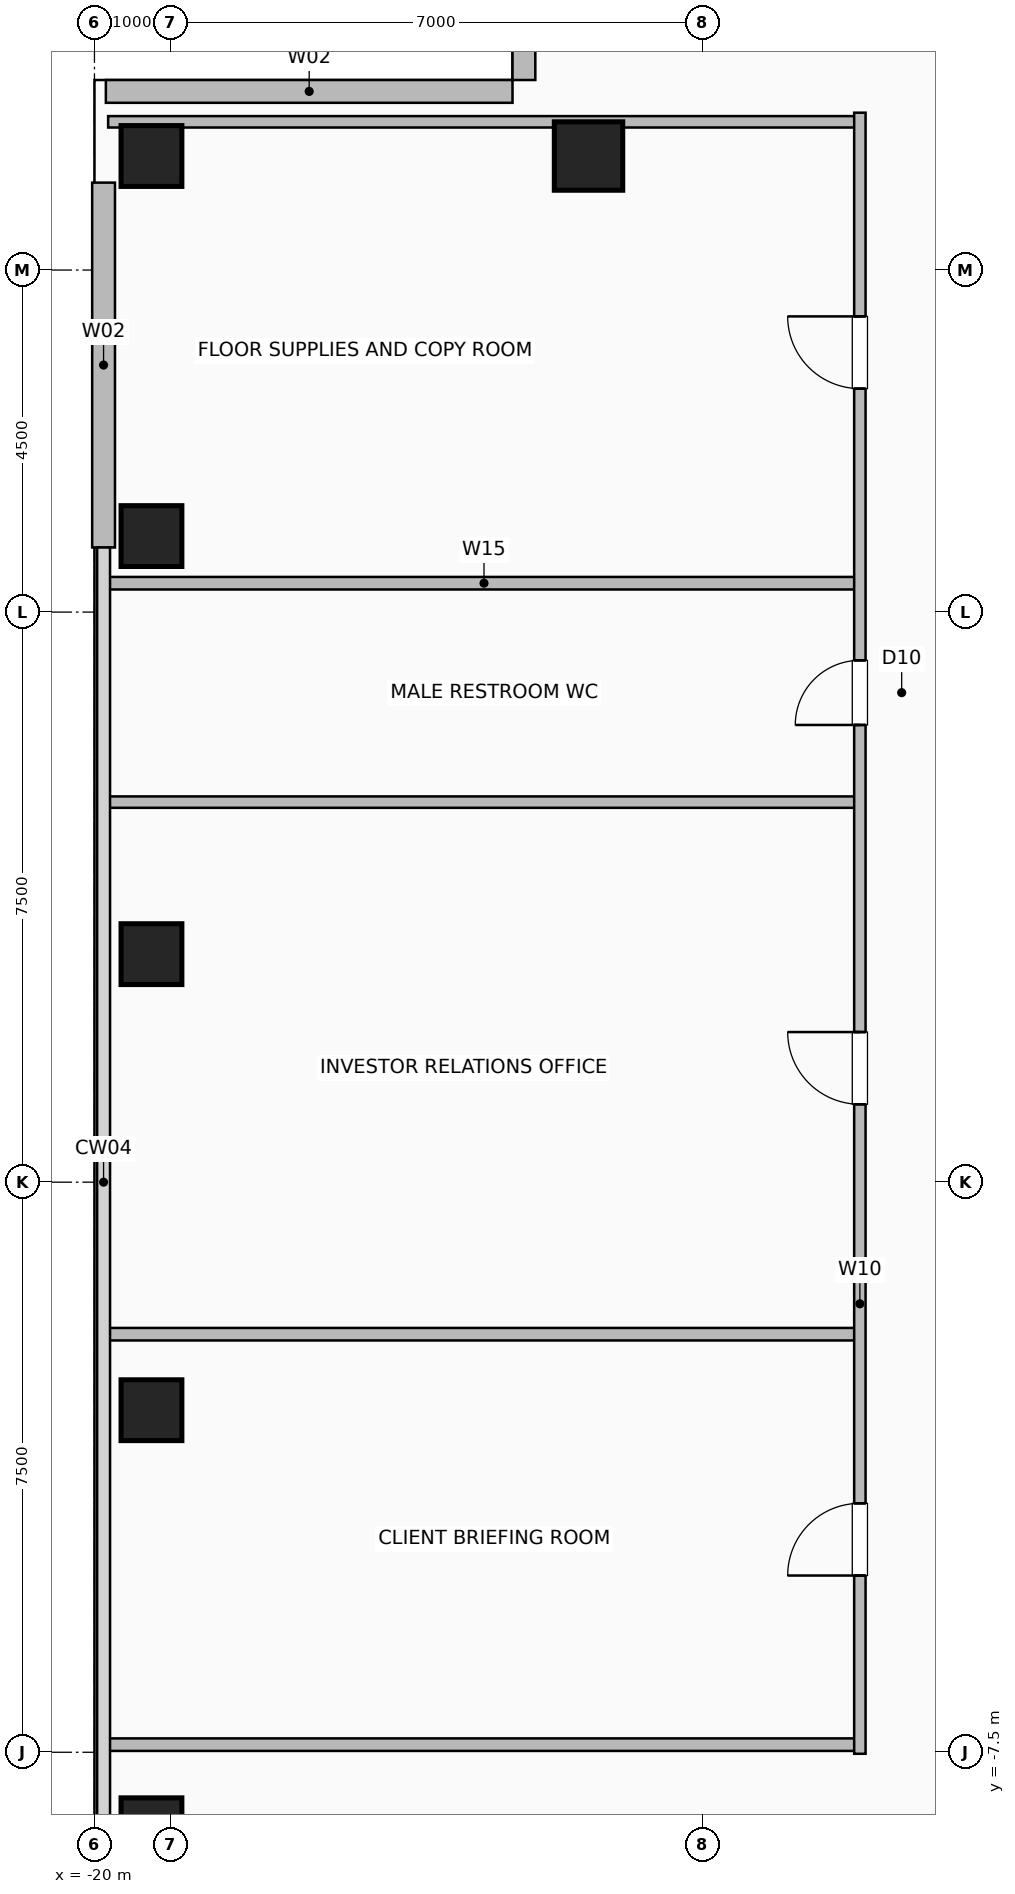
"""IFC4 building model, lengths in metres.
Left out: names, types, materials, properties, quantities, classifications, styles, units other than length and angle.
Written with IfcOpenShell. Run it as: python <this file> out.ifc"""

import sys

from ifc_helpers import new_model, si_unit, direction, frame, frame_2d, origin, origin_2d, place, context, subcontext, project, spatial, rectangle, hollow_rectangle, extrude, element, fill, save


model = new_model("IFC4")
c1 = context("Model", 3, precision=1e-05, world=origin(), true_north=direction((0.0, 1.0)))
c2 = subcontext(c1, "Body", "Model", "MODEL_VIEW")
j1 = project(units=[si_unit("LENGTHUNIT", "METRE"), si_unit("PLANEANGLEUNIT", "RADIAN")], contexts=[c1])
p1 = place(None, origin())
s1 = spatial("IfcSite", under=j1, at=p1, CompositionType="ELEMENT")
p2 = place(p1, origin())
s2 = spatial("IfcBuilding", under=s1, at=p2, CompositionType="ELEMENT")
p3 = place(p2, frame((0.0, 0.0, 213.0)))
s3 = spatial("IfcBuildingStorey", under=s2, at=p3, CompositionType="ELEMENT", Elevation=213.0)
for number, where, z_axis, x_axis in (
    (1, (-19.25, -8.5, 0.0), (0.0, 0.0, 1.0), (1.0, 0.0, 0.0)),
    (2, (-19.25, -3.0, 0.0), (0.0, 0.0, 1.0), (1.0, 0.0, 0.0)),
    (3, (-19.25, 3.0, 0.0), (0.0, 0.0, 1.0), (1.0, 0.0, 0.0)),
    (4, (-19.25, 8.5, 0.0), (0.0, 0.0, 1.0), (1.0, 0.0, 0.0)),
    (5, (-19.25, 13.5, 0.0), (0.0, 0.0, 1.0), (1.0, 0.0, 0.0)),
):
    element("IfcColumn", number, at=place(p3, frame(where, z_axis=z_axis, x_axis=x_axis)), inside=s3, PredefinedType="COLUMN", context=c2, shape_type="SweptSolid", body=[
        extrude(hollow_rectangle(XDim=0.8, YDim=0.8, WallThickness=0.04, at=origin_2d()), origin(), (0.0, 0.0, 1.0), 3.6),
    ])
p4 = place(p3, frame((-13.5, 13.5, 0.0), z_axis=(0.0, 0.0, 1.0), x_axis=(1.0, 0.0, 0.0)))
e6 = element("IfcColumn", 6, at=p4, inside=s3, PredefinedType="COLUMN", context=c2, shape_type="SweptSolid", body=[
    extrude(hollow_rectangle(XDim=0.9, YDim=0.9, WallThickness=0.045, at=origin_2d()), origin(), (0.0, 0.0, 1.0), 3.6),
])
p5 = place(p3, frame((-19.88, 8.35, 0.0), z_axis=(0.0, 0.0, 1.0), x_axis=(0.0, 1.0, 0.0)))
e7 = element("IfcWall", 7, at=p5, inside=s3, PredefinedType="SOLIDWALL", context=c2, shape_type="SweptSolid", body=[
    extrude(rectangle(XDim=4.8, YDim=0.3, at=frame_2d((2.4, 0.0))), origin(), (0.0, 0.0, 1.0), 3.36),
])
p6 = place(p3, frame((-14.35, 19.85, 0.0), z_axis=(0.0, 0.0, 1.0), x_axis=(0.0, -1.0, 0.0)))
e8 = element("IfcWall", 8, at=p6, inside=s3, PredefinedType="SOLIDWALL", context=c2, shape_type="SweptSolid", body=[
    extrude(rectangle(XDim=5.35, YDim=0.3, at=frame_2d((2.675, 0.0))), origin(), (0.0, 0.0, 1.0), 3.36),
])
p7 = place(p6, frame((1.925, 0.0, 0.9)))
e9 = element("IfcOpeningElement", 9, at=p7, cuts=e8, PredefinedType="OPENING", context=c2, shape_type="SweptSolid", body=[
    extrude(rectangle(XDim=1.5, YDim=1.8, at=frame_2d((0.75, 0.9))), frame((0.0, 0.16, 0.0), z_axis=(0.0, -1.0, 0.0), x_axis=(1.0, 0.0, 0.0)), (0.0, 0.0, 1.0), 0.32),
])
p8 = place(p3, frame((-19.85, 14.35, 0.0), z_axis=(0.0, 0.0, 1.0), x_axis=(1.0, 0.0, 0.0)))
e10 = element("IfcWall", 10, at=p8, inside=s3, PredefinedType="SOLIDWALL", context=c2, shape_type="SweptSolid", body=[
    extrude(rectangle(XDim=5.35, YDim=0.3, at=frame_2d((2.675, 0.0))), origin(), (0.0, 0.0, 1.0), 3.36),
])
for number, where, z_axis, x_axis in (
    (11, (-19.82, 7.88, 0.0), (0.0, 0.0, 1.0), (1.0, 0.0, 0.0)),
    (12, (-19.82, -7.4, 0.0), (0.0, 0.0, 1.0), (1.0, 0.0, 0.0)),
    (13, (-19.82, -2.0, 0.0), (0.0, 0.0, 1.0), (1.0, 0.0, 0.0)),
):
    element("IfcWall", number, at=place(p3, frame(where, z_axis=z_axis, x_axis=x_axis)), inside=s3, PredefinedType="PLUMBINGWALL", context=c2, shape_type="SweptSolid", body=[
        extrude(rectangle(XDim=9.89, YDim=0.165, at=frame_2d((4.945, 0.0))), origin(), (0.0, 0.0, 1.0), 3.36),
    ])
for number, where, z_axis, x_axis in (
    (14, (-19.82, 5.0, 0.0), (0.0, 0.0, 1.0), (1.0, 0.0, 0.0)),
    (15, (-19.82, 13.95, 0.0), (0.0, 0.0, 1.0), (1.0, 0.0, 0.0)),
):
    element("IfcWall", number, at=place(p3, frame(where, z_axis=z_axis, x_axis=x_axis)), inside=s3, PredefinedType="PARTITIONING", context=c2, shape_type="SweptSolid", body=[
        extrude(rectangle(XDim=9.89, YDim=0.15, at=frame_2d((4.945, 0.0))), origin(), (0.0, 0.0, 1.0), 3.36),
    ])
p9 = place(p3, frame((-9.93, -7.52, 0.0), z_axis=(0.0, 0.0, 1.0), x_axis=(0.0, 1.0, 0.0)))
e16 = element("IfcWall", 16, at=p9, inside=s3, PredefinedType="PARTITIONING", context=c2, shape_type="SweptSolid", body=[
    extrude(rectangle(XDim=21.59, YDim=0.15, at=frame_2d((10.795, 0.0))), origin(), (0.0, 0.0, 1.0), 3.36),
])
p10 = place(p9, frame((2.345, 0.0, 0.0)))
e17 = element("IfcOpeningElement", 17, at=p10, cuts=e16, PredefinedType="OPENING", context=c2, shape_type="SweptSolid", body=[
    extrude(rectangle(XDim=0.95, YDim=2.06, at=frame_2d((0.475, 1.03))), frame((0.0, 0.085, 0.0), z_axis=(0.0, -1.0, 0.0), x_axis=(1.0, 0.0, 0.0)), (0.0, 0.0, 1.0), 0.17),
])
p11 = place(p9, frame((8.545, 0.0, 0.0)))
e18 = element("IfcOpeningElement", 18, at=p11, cuts=e16, PredefinedType="OPENING", context=c2, shape_type="SweptSolid", body=[
    extrude(rectangle(XDim=0.95, YDim=2.06, at=frame_2d((0.475, 1.03))), frame((0.0, 0.085, 0.0), z_axis=(0.0, -1.0, 0.0), x_axis=(1.0, 0.0, 0.0)), (0.0, 0.0, 1.0), 0.17),
])
p12 = place(p9, frame((13.535, 0.0, 0.0)))
e19 = element("IfcOpeningElement", 19, at=p12, cuts=e16, PredefinedType="OPENING", context=c2, shape_type="SweptSolid", body=[
    extrude(rectangle(XDim=0.85, YDim=2.05, at=frame_2d((0.425, 1.025))), frame((0.0, 0.085, 0.0), z_axis=(0.0, -1.0, 0.0), x_axis=(1.0, 0.0, 0.0)), (0.0, 0.0, 1.0), 0.17),
])
p13 = place(p9, frame((17.96, 0.0, 0.0)))
e20 = element("IfcOpeningElement", 20, at=p13, cuts=e16, PredefinedType="OPENING", context=c2, shape_type="SweptSolid", body=[
    extrude(rectangle(XDim=0.95, YDim=2.06, at=frame_2d((0.475, 1.03))), frame((0.0, 0.085, 0.0), z_axis=(0.0, -1.0, 0.0), x_axis=(1.0, 0.0, 0.0)), (0.0, 0.0, 1.0), 0.17),
])
p14 = place(p10, origin())
e21 = element("IfcDoor", 21, at=p14, inside=s3, OperationType="SINGLE_SWING_LEFT", PredefinedType="DOOR", context=c2, shape_type="SweptSolid", body=[
    extrude(rectangle(XDim=0.95, YDim=2.06, at=frame_2d((0.475, 1.03))), frame((0.0, 0.025, 0.0), z_axis=(0.0, -1.0, 0.0), x_axis=(1.0, 0.0, 0.0)), (0.0, 0.0, 1.0), 0.05),
])
fill(e17, e21)
p15 = place(p11, origin())
e22 = element("IfcDoor", 22, at=p15, inside=s3, OperationType="SINGLE_SWING_RIGHT", PredefinedType="DOOR", context=c2, shape_type="SweptSolid", body=[
    extrude(rectangle(XDim=0.95, YDim=2.06, at=frame_2d((0.475, 1.03))), frame((0.0, 0.025, 0.0), z_axis=(0.0, -1.0, 0.0), x_axis=(1.0, 0.0, 0.0)), (0.0, 0.0, 1.0), 0.05),
])
fill(e18, e22)
p16 = place(p12, origin())
e23 = element("IfcDoor", 23, at=p16, inside=s3, OperationType="SINGLE_SWING_LEFT", PredefinedType="DOOR", context=c2, shape_type="SweptSolid", body=[
    extrude(rectangle(XDim=0.85, YDim=2.05, at=frame_2d((0.425, 1.025))), frame((0.0, 0.025, 0.0), z_axis=(0.0, -1.0, 0.0), x_axis=(1.0, 0.0, 0.0)), (0.0, 0.0, 1.0), 0.05),
])
fill(e19, e23)
p17 = place(p13, origin())
e24 = element("IfcDoor", 24, at=p17, inside=s3, OperationType="SINGLE_SWING_RIGHT", PredefinedType="DOOR", context=c2, shape_type="SweptSolid", body=[
    extrude(rectangle(XDim=0.95, YDim=2.06, at=frame_2d((0.475, 1.03))), frame((0.0, 0.025, 0.0), z_axis=(0.0, -1.0, 0.0), x_axis=(1.0, 0.0, 0.0)), (0.0, 0.0, 1.0), 0.05),
])
fill(e20, e24)
save(model, sys.argv[1])
